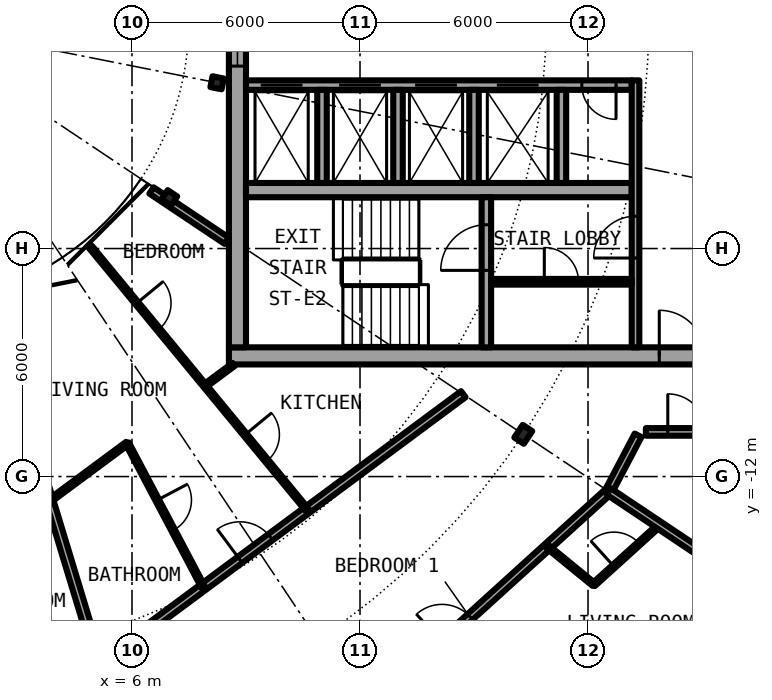
"""IFC4 building model, lengths in metres.
Left out: names, types, materials, properties, quantities, classifications, styles, units other than length and angle.
Written with IfcOpenShell. Run it as: python <this file> out.ifc"""

import sys

from ifc_helpers import new_model, si_unit, direction, frame, frame_2d, origin, origin_2d, place, context, subcontext, project, spatial, rectangle, i_section, extrude, element, fill, save


model = new_model("IFC4")
c1 = context("Model", 3, precision=1e-05, world=origin(), true_north=direction((0.0, 1.0)))
c2 = subcontext(c1, "Body", "Model", "MODEL_VIEW")
j1 = project(units=[si_unit("LENGTHUNIT", "METRE"), si_unit("PLANEANGLEUNIT", "RADIAN")], contexts=[c1])
p1 = place(None, origin())
s1 = spatial("IfcSite", under=j1, at=p1, CompositionType="ELEMENT")
p2 = place(p1, origin())
s2 = spatial("IfcBuilding", under=s1, at=p2, CompositionType="ELEMENT")
p3 = place(p2, frame((0.0, 0.0, 190.2)))
s3 = spatial("IfcBuildingStorey", under=s2, at=p3, CompositionType="ELEMENT", Elevation=190.2)
p4 = place(p3, frame((16.297, -10.889, 0.0), z_axis=(0.0, 0.0, 1.0), x_axis=(0.831469612303, -0.55557023302, 0.0)))
e1 = element("IfcColumn", 1, at=p4, inside=s3, PredefinedType="COLUMN", context=c2, shape_type="SweptSolid", body=[
    extrude(i_section(OverallWidth=0.3, OverallDepth=0.4, WebThickness=0.013, FlangeThickness=0.024, FilletRadius=0.027, at=origin_2d()), origin(), (0.0, 0.0, 1.0), 3.05),
])
for number, where, z_axis, x_axis in (
    (2, (6.984, -4.667, 0.0), (0.0, 0.0, 1.0), (0.831, -0.556, 0.0)),
    (3, (8.239, -1.639, 0.0), (0.0, 0.0, 1.0), (0.981, -0.195, 0.0)),
):
    element("IfcColumn", number, at=place(p3, frame(where, z_axis=z_axis, x_axis=x_axis)), inside=s3, PredefinedType="COLUMN", context=c2, shape_type="SweptSolid", body=[
        extrude(i_section(OverallWidth=0.3, OverallDepth=0.29, WebThickness=0.009, FlangeThickness=0.014, FilletRadius=0.027, at=origin_2d()), origin(), (0.0, 0.0, 1.0), 3.05),
    ])
p5 = place(p3, frame((19.304, -19.304, 0.0), z_axis=(0.0, 0.0, 1.0), x_axis=(0.634382322723, 0.773019449054, 0.0)))
e4 = element("IfcWall", 4, at=p5, inside=s3, PredefinedType="SOLIDWALL", context=c2, shape_type="SweptSolid", body=[
    extrude(rectangle(XDim=5.352, YDim=0.25, at=frame_2d((2.676, 0.0))), origin(), (0.0, 0.0, 1.0), 2.7),
])
p6 = place(p5, frame((0.841, 0.0, 0.0)))
e5 = element("IfcOpeningElement", 5, at=p6, cuts=e4, PredefinedType="OPENING", context=c2, shape_type="SweptSolid", body=[
    extrude(rectangle(XDim=1.0, YDim=2.2, at=frame_2d((0.5, 1.1))), frame((0.0, 0.135, 0.0), z_axis=(0.0, -1.0, 0.0), x_axis=(1.0, 0.0, 0.0)), (0.0, 0.0, 1.0), 0.27),
])
p7 = place(p5, frame((3.111, 0.0, 0.3)))
e6 = element("IfcOpeningElement", 6, at=p7, cuts=e4, PredefinedType="OPENING", context=c2, shape_type="SweptSolid", body=[
    extrude(rectangle(XDim=1.8, YDim=2.1, at=frame_2d((0.9, 1.05))), frame((0.0, 0.135, 0.0), z_axis=(0.0, -1.0, 0.0), x_axis=(1.0, 0.0, 0.0)), (0.0, 0.0, 1.0), 0.27),
])
p8 = place(p3, frame((8.55, -8.825, 0.0), z_axis=(0.0, 0.0, 1.0), x_axis=(1.0, 0.0, 0.0)))
e7 = element("IfcWall", 7, at=p8, inside=s3, PredefinedType="SHEAR", context=c2, shape_type="SweptSolid", body=[
    extrude(rectangle(XDim=13.5, YDim=0.45, at=frame_2d((6.75, 0.0))), origin(), (0.0, 0.0, 1.0), 3.05),
])
p9 = place(p8, frame((11.325, 0.0, 0.0)))
e8 = element("IfcOpeningElement", 8, at=p9, cuts=e7, PredefinedType="OPENING", context=c2, shape_type="SweptSolid", body=[
    extrude(rectangle(XDim=1.2, YDim=2.3, at=frame_2d((0.6, 1.15))), frame((0.0, 0.235, 0.0), z_axis=(0.0, -1.0, 0.0), x_axis=(1.0, 0.0, 0.0)), (0.0, 0.0, 1.0), 0.47),
])
p10 = place(p3, frame((8.775, -8.6, 0.0), z_axis=(0.0, 0.0, 1.0), x_axis=(0.0, 1.0, 0.0)))
e9 = element("IfcWall", 9, at=p10, inside=s3, PredefinedType="SHEAR", context=c2, shape_type="SweptSolid", body=[
    extrude(rectangle(XDim=17.2, YDim=0.45, at=frame_2d((8.6, 0.0))), origin(), (0.0, 0.0, 1.0), 3.05),
])
p11 = place(p10, frame((7.4, 0.0, 0.1)))
e10 = element("IfcOpeningElement", 10, at=p11, cuts=e9, PredefinedType="OPENING", context=c2, shape_type="SweptSolid", body=[
    extrude(rectangle(XDim=2.4, YDim=2.2, at=frame_2d((1.2, 1.1))), frame((0.0, 0.235, 0.0), z_axis=(0.0, -1.0, 0.0), x_axis=(1.0, 0.0, 0.0)), (0.0, 0.0, 1.0), 0.47),
])
p12 = place(p3, frame((19.15, -1.7, 0.0), z_axis=(0.0, 0.0, 1.0), x_axis=(-1.0, 0.0, 0.0)))
e11 = element("IfcWall", 11, at=p12, inside=s3, PredefinedType="SHEAR", context=c2, shape_type="SweptSolid", body=[
    extrude(rectangle(XDim=10.15, YDim=0.25, at=frame_2d((5.075, 0.0))), origin(), (0.0, 0.0, 1.0), 3.05),
])
p13 = place(p12, frame((8.663, 0.0, 0.0)))
e12 = element("IfcOpeningElement", 12, at=p13, cuts=e11, PredefinedType="OPENING", context=c2, shape_type="SweptSolid", body=[
    extrude(rectangle(XDim=1.1, YDim=2.3, at=frame_2d((0.55, 1.15))), frame((0.0, 0.135, 0.0), z_axis=(0.0, -1.0, 0.0), x_axis=(1.0, 0.0, 0.0)), (0.0, 0.0, 1.0), 0.27),
])
p14 = place(p12, frame((6.6, 0.0, 0.0)))
e13 = element("IfcOpeningElement", 13, at=p14, cuts=e11, PredefinedType="OPENING", context=c2, shape_type="SweptSolid", body=[
    extrude(rectangle(XDim=1.1, YDim=2.3, at=frame_2d((0.55, 1.15))), frame((0.0, 0.135, 0.0), z_axis=(0.0, -1.0, 0.0), x_axis=(1.0, 0.0, 0.0)), (0.0, 0.0, 1.0), 0.27),
])
p15 = place(p12, frame((4.6, 0.0, 0.0)))
e14 = element("IfcOpeningElement", 14, at=p15, cuts=e11, PredefinedType="OPENING", context=c2, shape_type="SweptSolid", body=[
    extrude(rectangle(XDim=1.1, YDim=2.3, at=frame_2d((0.55, 1.15))), frame((0.0, 0.135, 0.0), z_axis=(0.0, -1.0, 0.0), x_axis=(1.0, 0.0, 0.0)), (0.0, 0.0, 1.0), 0.27),
])
p16 = place(p12, frame((2.45, 0.0, 0.0)))
e15 = element("IfcOpeningElement", 15, at=p16, cuts=e11, PredefinedType="OPENING", context=c2, shape_type="SweptSolid", body=[
    extrude(rectangle(XDim=1.1, YDim=2.3, at=frame_2d((0.55, 1.15))), frame((0.0, 0.135, 0.0), z_axis=(0.0, -1.0, 0.0), x_axis=(1.0, 0.0, 0.0)), (0.0, 0.0, 1.0), 0.27),
])
p17 = place(p12, frame((0.413, 0.0, 0.0)))
e16 = element("IfcOpeningElement", 16, at=p17, cuts=e11, PredefinedType="OPENING", context=c2, shape_type="SweptSolid", body=[
    extrude(rectangle(XDim=0.9, YDim=2.3, at=frame_2d((0.45, 1.15))), frame((0.0, 0.135, 0.0), z_axis=(0.0, -1.0, 0.0), x_axis=(1.0, 0.0, 0.0)), (0.0, 0.0, 1.0), 0.27),
])
p18 = place(p3, frame((9.0, -4.462, 0.0), z_axis=(0.0, 0.0, 1.0), x_axis=(1.0, 0.0, 0.0)))
e17 = element("IfcWall", 17, at=p18, inside=s3, PredefinedType="SHEAR", context=c2, shape_type="SweptSolid", body=[
    extrude(rectangle(XDim=10.15, YDim=0.375, at=frame_2d((5.075, 0.0))), origin(), (0.0, 0.0, 1.0), 3.05),
])
p19 = place(p3, frame((15.325, -8.6, 0.0), z_axis=(0.0, 0.0, 1.0), x_axis=(0.0, 1.0, 0.0)))
e18 = element("IfcWall", 18, at=p19, inside=s3, PredefinedType="SHEAR", context=c2, shape_type="SweptSolid", body=[
    extrude(rectangle(XDim=3.95, YDim=0.25, at=frame_2d((1.975, 0.0))), origin(), (0.0, 0.0, 1.0), 3.05),
])
p20 = place(p19, frame((2.025, 0.0, 0.0)))
e19 = element("IfcOpeningElement", 19, at=p20, cuts=e18, PredefinedType="OPENING", context=c2, shape_type="SweptSolid", body=[
    extrude(rectangle(XDim=1.2, YDim=2.3, at=frame_2d((0.6, 1.15))), frame((0.0, 0.135, 0.0), z_axis=(0.0, -1.0, 0.0), x_axis=(1.0, 0.0, 0.0)), (0.0, 0.0, 1.0), 0.27),
])
for number, where, z_axis, x_axis in (
    (20, (15.0, -1.825, 0.0), (0.0, 0.0, 1.0), (0.0, -1.0, 0.0)),
    (21, (17.3, -1.825, 0.0), (0.0, 0.0, 1.0), (0.0, -1.0, 0.0)),
):
    element("IfcWall", number, at=place(p3, frame(where, z_axis=z_axis, x_axis=x_axis)), inside=s3, PredefinedType="SOLIDWALL", context=c2, shape_type="SweptSolid", body=[
        extrude(rectangle(XDim=2.45, YDim=0.25, at=frame_2d((1.225, 0.0))), origin(), (0.0, 0.0, 1.0), 2.7),
    ])
p21 = place(p3, frame((19.25, -8.6, 0.0), z_axis=(0.0, 0.0, 1.0), x_axis=(0.0, 1.0, 0.0)))
e22 = element("IfcWall", 22, at=p21, inside=s3, PredefinedType="SOLIDWALL", context=c2, shape_type="SweptSolid", body=[
    extrude(rectangle(XDim=7.025, YDim=0.2, at=frame_2d((3.513, 0.0))), origin(), (0.0, 0.0, 1.0), 2.7),
])
p22 = place(p21, frame((2.35, 0.0, 0.0)))
e23 = element("IfcOpeningElement", 23, at=p22, cuts=e22, PredefinedType="OPENING", context=c2, shape_type="SweptSolid", body=[
    extrude(rectangle(XDim=1.1, YDim=2.3, at=frame_2d((0.55, 1.15))), frame((0.0, 0.11, 0.0), z_axis=(0.0, -1.0, 0.0), x_axis=(1.0, 0.0, 0.0)), (0.0, 0.0, 1.0), 0.22),
])
for number, where, z_axis, x_axis in (
    (24, (11.0, -1.825, 0.0), (0.0, 0.0, 1.0), (0.0, -1.0, 0.0)),
    (25, (13.0, -1.825, 0.0), (0.0, 0.0, 1.0), (0.0, -1.0, 0.0)),
):
    element("IfcWall", number, at=place(p3, frame(where, z_axis=z_axis, x_axis=x_axis)), inside=s3, PredefinedType="SOLIDWALL", context=c2, shape_type="SweptSolid", body=[
        extrude(rectangle(XDim=2.45, YDim=0.25, at=frame_2d((1.225, 0.0))), origin(), (0.0, 0.0, 1.0), 2.7),
    ])
p23 = place(p3, frame((15.45, -6.875, 0.0), z_axis=(0.0, 0.0, 1.0), x_axis=(1.0, 0.0, 0.0)))
e26 = element("IfcWall", 26, at=p23, inside=s3, PredefinedType="PARTITIONING", context=c2, shape_type="SweptSolid", body=[
    extrude(rectangle(XDim=3.7, YDim=0.15, at=frame_2d((1.85, 0.0))), origin(), (0.0, 0.0, 1.0), 2.7),
])
p24 = place(p23, frame((1.4, 0.0, 0.0)))
e27 = element("IfcOpeningElement", 27, at=p24, cuts=e26, PredefinedType="OPENING", context=c2, shape_type="SweptSolid", body=[
    extrude(rectangle(XDim=0.9, YDim=2.3, at=frame_2d((0.45, 1.15))), frame((0.0, 0.085, 0.0), z_axis=(0.0, -1.0, 0.0), x_axis=(1.0, 0.0, 0.0)), (0.0, 0.0, 1.0), 0.17),
])
p25 = place(p3, frame((18.147, -14.844, 0.0), z_axis=(0.0, 0.0, 1.0), x_axis=(0.741080073381, 0.671416655169, 0.0)))
e28 = element("IfcWall", 28, at=p25, inside=s3, PredefinedType="PARTITIONING", context=c2, shape_type="SweptSolid", body=[
    extrude(rectangle(XDim=2.323, YDim=0.1, at=frame_2d((1.162, 0.0))), origin(), (0.0, 0.0, 1.0), 2.7),
])
p26 = place(p25, frame((0.718, 0.0, 0.0)))
e29 = element("IfcOpeningElement", 29, at=p26, cuts=e28, PredefinedType="OPENING", context=c2, shape_type="SweptSolid", body=[
    extrude(rectangle(XDim=0.9, YDim=2.3, at=frame_2d((0.45, 1.15))), frame((0.0, 0.06, 0.0), z_axis=(0.0, -1.0, 0.0), x_axis=(1.0, 0.0, 0.0)), (0.0, 0.0, 1.0), 0.12),
])
p27 = place(p3, frame((18.542, -12.389, 0.0), z_axis=(0.0, 0.0, 1.0), x_axis=(0.465359652486, 0.885121683068, 0.0)))
e30 = element("IfcWall", 30, at=p27, inside=s3, PredefinedType="PARTITIONING", context=c2, shape_type="SweptSolid", body=[
    extrude(rectangle(XDim=1.665, YDim=0.2, at=frame_2d((0.833, 0.0))), origin(), (0.0, 0.0, 1.0), 2.7),
])
p28 = place(p3, frame((10.51, -19.669, 0.0), z_axis=(0.0, 0.0, 1.0), x_axis=(0.74093897184, 0.671572363941, 0.0)))
e31 = element("IfcWall", 31, at=p28, inside=s3, PredefinedType="PARTITIONING", context=c2, shape_type="SweptSolid", body=[
    extrude(rectangle(XDim=10.84, YDim=0.2, at=frame_2d((5.42, 0.0))), origin(), (0.0, 0.0, 1.0), 2.7),
])
p29 = place(p28, frame((4.922, 0.0, 0.0)))
e32 = element("IfcOpeningElement", 32, at=p29, cuts=e31, PredefinedType="OPENING", context=c2, shape_type="SweptSolid", body=[
    extrude(rectangle(XDim=1.0, YDim=2.3, at=frame_2d((0.5, 1.15))), frame((0.0, 0.11, 0.0), z_axis=(0.0, -1.0, 0.0), x_axis=(1.0, 0.0, 0.0)), (0.0, 0.0, 1.0), 0.22),
])
p30 = place(p3, frame((5.137, -16.938, 0.0), z_axis=(0.0, 0.0, 1.0), x_axis=(0.803240181354, 0.595655278712, 0.0)))
e33 = element("IfcWall", 33, at=p30, inside=s3, PredefinedType="PARTITIONING", context=c2, shape_type="SweptSolid", body=[
    extrude(rectangle(XDim=11.928, YDim=0.2, at=frame_2d((5.964, 0.0))), origin(), (0.0, 0.0, 1.0), 2.7),
])
p31 = place(p30, frame((4.612, 0.0, 0.0)))
e34 = element("IfcOpeningElement", 34, at=p31, cuts=e33, PredefinedType="OPENING", context=c2, shape_type="SweptSolid", body=[
    extrude(rectangle(XDim=1.0, YDim=2.3, at=frame_2d((0.5, 1.15))), frame((0.0, 0.11, 0.0), z_axis=(0.0, -1.0, 0.0), x_axis=(1.0, 0.0, 0.0)), (0.0, 0.0, 1.0), 0.22),
])
p32 = place(p3, frame((3.83, -12.641, 0.0), z_axis=(0.0, 0.0, 1.0), x_axis=(0.803533389313, 0.595259684725, 0.0)))
e35 = element("IfcWall", 35, at=p32, inside=s3, PredefinedType="PARTITIONING", context=c2, shape_type="SweptSolid", body=[
    extrude(rectangle(XDim=2.544, YDim=0.1, at=frame_2d((1.272, 0.0))), origin(), (0.0, 0.0, 1.0), 2.7),
])
p33 = place(p3, frame((7.919, -9.611, 0.0), z_axis=(0.0, 0.0, 1.0), x_axis=(0.803437844371, 0.595388637977, 0.0)))
e36 = element("IfcWall", 36, at=p33, inside=s3, PredefinedType="PARTITIONING", context=c2, shape_type="SweptSolid", body=[
    extrude(rectangle(XDim=0.942, YDim=0.1, at=frame_2d((0.471, 0.0))), origin(), (0.0, 0.0, 1.0), 2.7),
])
p34 = place(p3, frame((19.523, -10.825, 0.0), z_axis=(0.0, 0.0, 1.0), x_axis=(1.0, 0.0, 0.0)))
e37 = element("IfcWall", 37, at=p34, inside=s3, PredefinedType="PARTITIONING", context=c2, shape_type="SweptSolid", body=[
    extrude(rectangle(XDim=2.152, YDim=0.2, at=frame_2d((1.076, 0.0))), origin(), (0.0, 0.0, 1.0), 2.7),
])
p35 = place(p34, frame((0.576, 0.0, 0.0)))
e38 = element("IfcOpeningElement", 38, at=p35, cuts=e37, PredefinedType="OPENING", context=c2, shape_type="SweptSolid", body=[
    extrude(rectangle(XDim=1.0, YDim=2.3, at=frame_2d((0.5, 1.15))), frame((0.0, 0.11, 0.0), z_axis=(0.0, -1.0, 0.0), x_axis=(1.0, 0.0, 0.0)), (0.0, 0.0, 1.0), 0.22),
])
p36 = place(p3, frame((6.513, -4.472, 0.0), z_axis=(0.0, 0.0, 1.0), x_axis=(0.831403409976, -0.555669299026, 0.0)))
e39 = element("IfcWall", 39, at=p36, inside=s3, PredefinedType="PARTITIONING", context=c2, shape_type="SweptSolid", body=[
    extrude(rectangle(XDim=2.383, YDim=0.2, at=frame_2d((1.191, 0.0))), origin(), (0.0, 0.0, 1.0), 2.7),
])
p37 = place(p3, frame((2.241, -7.388, 0.0), z_axis=(0.0, 0.0, 1.0), x_axis=(0.290284403441, -0.956940418793, 0.0)))
e40 = element("IfcWall", 40, at=p37, inside=s3, PredefinedType="PARTITIONING", context=c2, shape_type="SweptSolid", body=[
    extrude(rectangle(XDim=9.98, YDim=0.2, at=frame_2d((4.99, 0.0))), origin(), (0.0, 0.0, 1.0), 2.7),
])
p38 = place(p3, frame((4.908, -5.959, 0.0), z_axis=(0.0, 0.0, 1.0), x_axis=(0.636115614725, -0.771593756262, 0.0)))
e41 = element("IfcWall", 41, at=p38, inside=s3, PredefinedType="PARTITIONING", context=c2, shape_type="SweptSolid", body=[
    extrude(rectangle(XDim=8.967, YDim=0.1, at=frame_2d((4.483, 0.0))), origin(), (0.0, 0.0, 1.0), 2.7),
])
p39 = place(p38, frame((6.4, 0.0, 0.0)))
e42 = element("IfcOpeningElement", 42, at=p39, cuts=e41, PredefinedType="OPENING", context=c2, shape_type="SweptSolid", body=[
    extrude(rectangle(XDim=0.9, YDim=2.3, at=frame_2d((0.45, 1.15))), frame((0.0, 0.06, 0.0), z_axis=(0.0, -1.0, 0.0), x_axis=(1.0, 0.0, 0.0)), (0.0, 0.0, 1.0), 0.12),
])
p40 = place(p38, frame((1.917, 0.0, 0.0)))
e43 = element("IfcOpeningElement", 43, at=p40, cuts=e41, PredefinedType="OPENING", context=c2, shape_type="SweptSolid", body=[
    extrude(rectangle(XDim=0.9, YDim=2.3, at=frame_2d((0.45, 1.15))), frame((0.0, 0.06, 0.0), z_axis=(0.0, -1.0, 0.0), x_axis=(1.0, 0.0, 0.0)), (0.0, 0.0, 1.0), 0.12),
])
p41 = place(p3, frame((5.876, -11.126, 0.0), z_axis=(0.0, 0.0, 1.0), x_axis=(0.467030118529, -0.884241408432, 0.0)))
e44 = element("IfcWall", 44, at=p41, inside=s3, PredefinedType="PARTITIONING", context=c2, shape_type="SweptSolid", body=[
    extrude(rectangle(XDim=4.278, YDim=0.1, at=frame_2d((2.139, 0.0))), origin(), (0.0, 0.0, 1.0), 2.7),
])
p42 = place(p41, frame((1.689, 0.0, 0.0)))
e45 = element("IfcOpeningElement", 45, at=p42, cuts=e44, PredefinedType="OPENING", context=c2, shape_type="SweptSolid", body=[
    extrude(rectangle(XDim=0.9, YDim=2.3, at=frame_2d((0.45, 1.15))), frame((0.0, 0.06, 0.0), z_axis=(0.0, -1.0, 0.0), x_axis=(1.0, 0.0, 0.0)), (0.0, 0.0, 1.0), 0.12),
])
p43 = place(p3, frame((16.936, -13.845, 0.0), z_axis=(0.0, 0.0, 1.0), x_axis=(0.774283039722, -0.632839453889, 0.0)))
e46 = element("IfcWall", 46, at=p43, inside=s3, PredefinedType="PARTITIONING", context=c2, shape_type="SweptSolid", body=[
    extrude(rectangle(XDim=1.569, YDim=0.1, at=frame_2d((0.785, 0.0))), origin(), (0.0, 0.0, 1.0), 2.7),
])
p44 = place(p3, frame((18.542, -12.389, 0.0), z_axis=(0.0, 0.0, 1.0), x_axis=(0.831387096605, -0.55569370664, 0.0)))
e47 = element("IfcWall", 47, at=p44, inside=s3, PredefinedType="PARTITIONING", context=c2, shape_type="SweptSolid", body=[
    extrude(rectangle(XDim=4.875, YDim=0.2, at=frame_2d((2.438, 0.0))), origin(), (0.0, 0.0, 1.0), 2.7),
])
p45 = place(p13, origin())
e48 = element("IfcDoor", 48, at=p45, inside=s3, OperationType="DOUBLE_DOOR_SLIDING", PredefinedType="DOOR", context=c2, shape_type="SweptSolid", body=[
    extrude(rectangle(XDim=1.1, YDim=2.3, at=frame_2d((0.55, 1.15))), frame((0.0, 0.025, 0.0), z_axis=(0.0, -1.0, 0.0), x_axis=(1.0, 0.0, 0.0)), (0.0, 0.0, 1.0), 0.05),
])
fill(e12, e48)
p46 = place(p14, origin())
e49 = element("IfcDoor", 49, at=p46, inside=s3, OperationType="DOUBLE_DOOR_SLIDING", PredefinedType="DOOR", context=c2, shape_type="SweptSolid", body=[
    extrude(rectangle(XDim=1.1, YDim=2.3, at=frame_2d((0.55, 1.15))), frame((0.0, 0.025, 0.0), z_axis=(0.0, -1.0, 0.0), x_axis=(1.0, 0.0, 0.0)), (0.0, 0.0, 1.0), 0.05),
])
fill(e13, e49)
p47 = place(p15, origin())
e50 = element("IfcDoor", 50, at=p47, inside=s3, OperationType="DOUBLE_DOOR_SLIDING", PredefinedType="DOOR", context=c2, shape_type="SweptSolid", body=[
    extrude(rectangle(XDim=1.1, YDim=2.3, at=frame_2d((0.55, 1.15))), frame((0.0, 0.025, 0.0), z_axis=(0.0, -1.0, 0.0), x_axis=(1.0, 0.0, 0.0)), (0.0, 0.0, 1.0), 0.05),
])
fill(e14, e50)
p48 = place(p16, origin())
e51 = element("IfcDoor", 51, at=p48, inside=s3, OperationType="DOUBLE_DOOR_SLIDING", PredefinedType="DOOR", context=c2, shape_type="SweptSolid", body=[
    extrude(rectangle(XDim=1.1, YDim=2.3, at=frame_2d((0.55, 1.15))), frame((0.0, 0.025, 0.0), z_axis=(0.0, -1.0, 0.0), x_axis=(1.0, 0.0, 0.0)), (0.0, 0.0, 1.0), 0.05),
])
fill(e15, e51)
p49 = place(p17, origin())
e52 = element("IfcDoor", 52, at=p49, inside=s3, OperationType="SINGLE_SWING_RIGHT", PredefinedType="DOOR", context=c2, shape_type="SweptSolid", body=[
    extrude(rectangle(XDim=0.9, YDim=2.3, at=frame_2d((0.45, 1.15))), frame((0.0, 0.025, 0.0), z_axis=(0.0, -1.0, 0.0), x_axis=(1.0, 0.0, 0.0)), (0.0, 0.0, 1.0), 0.05),
])
fill(e16, e52)
p50 = place(p24, origin())
e53 = element("IfcDoor", 53, at=p50, inside=s3, OperationType="SINGLE_SWING_LEFT", PredefinedType="DOOR", context=c2, shape_type="SweptSolid", body=[
    extrude(rectangle(XDim=0.9, YDim=2.3, at=frame_2d((0.45, 1.15))), frame((0.0, 0.025, 0.0), z_axis=(0.0, -1.0, 0.0), x_axis=(1.0, 0.0, 0.0)), (0.0, 0.0, 1.0), 0.05),
])
fill(e27, e53)
p51 = place(p20, origin())
e54 = element("IfcDoor", 54, at=p51, inside=s3, OperationType="SINGLE_SWING_LEFT", PredefinedType="DOOR", context=c2, shape_type="SweptSolid", body=[
    extrude(rectangle(XDim=1.2, YDim=2.3, at=frame_2d((0.6, 1.15))), frame((0.0, 0.025, 0.0), z_axis=(0.0, -1.0, 0.0), x_axis=(1.0, 0.0, 0.0)), (0.0, 0.0, 1.0), 0.05),
])
fill(e19, e54)
p52 = place(p22, origin())
e55 = element("IfcDoor", 55, at=p52, inside=s3, OperationType="SINGLE_SWING_RIGHT", PredefinedType="DOOR", context=c2, shape_type="SweptSolid", body=[
    extrude(rectangle(XDim=1.1, YDim=2.3, at=frame_2d((0.55, 1.15))), frame((0.0, 0.025, 0.0), z_axis=(0.0, -1.0, 0.0), x_axis=(1.0, 0.0, 0.0)), (0.0, 0.0, 1.0), 0.05),
])
fill(e23, e55)
p53 = place(p9, origin())
e56 = element("IfcDoor", 56, at=p53, inside=s3, OperationType="SINGLE_SWING_LEFT", PredefinedType="DOOR", context=c2, shape_type="SweptSolid", body=[
    extrude(rectangle(XDim=1.2, YDim=2.3, at=frame_2d((0.6, 1.15))), frame((0.0, 0.025, 0.0), z_axis=(0.0, -1.0, 0.0), x_axis=(1.0, 0.0, 0.0)), (0.0, 0.0, 1.0), 0.05),
])
fill(e8, e56)
p54 = place(p11, origin())
e57 = element("IfcWindow", 57, at=p54, inside=s3, PartitioningType="SINGLE_PANEL", PredefinedType="WINDOW", context=c2, shape_type="SweptSolid", body=[
    extrude(rectangle(XDim=2.4, YDim=2.2, at=frame_2d((1.2, 1.1))), frame((0.0, 0.03, 0.0), z_axis=(0.0, -1.0, 0.0), x_axis=(1.0, 0.0, 0.0)), (0.0, 0.0, 1.0), 0.06),
])
fill(e10, e57)
p55 = place(p29, origin())
e58 = element("IfcDoor", 58, at=p55, inside=s3, OperationType="SINGLE_SWING_RIGHT", PredefinedType="DOOR", context=c2, shape_type="SweptSolid", body=[
    extrude(rectangle(XDim=1.0, YDim=2.3, at=frame_2d((0.5, 1.15))), frame((0.0, 0.025, 0.0), z_axis=(0.0, -1.0, 0.0), x_axis=(1.0, 0.0, 0.0)), (0.0, 0.0, 1.0), 0.05),
])
fill(e32, e58)
p56 = place(p26, origin())
e59 = element("IfcDoor", 59, at=p56, inside=s3, OperationType="SINGLE_SWING_RIGHT", PredefinedType="DOOR", context=c2, shape_type="SweptSolid", body=[
    extrude(rectangle(XDim=0.9, YDim=2.3, at=frame_2d((0.45, 1.15))), frame((0.0, 0.025, 0.0), z_axis=(0.0, -1.0, 0.0), x_axis=(1.0, 0.0, 0.0)), (0.0, 0.0, 1.0), 0.05),
])
fill(e29, e59)
p57 = place(p31, origin())
e60 = element("IfcDoor", 60, at=p57, inside=s3, OperationType="SINGLE_SWING_LEFT", PredefinedType="DOOR", context=c2, shape_type="SweptSolid", body=[
    extrude(rectangle(XDim=1.0, YDim=2.3, at=frame_2d((0.5, 1.15))), frame((0.0, 0.025, 0.0), z_axis=(0.0, -1.0, 0.0), x_axis=(1.0, 0.0, 0.0)), (0.0, 0.0, 1.0), 0.05),
])
fill(e34, e60)
p58 = place(p42, origin())
e61 = element("IfcDoor", 61, at=p58, inside=s3, OperationType="SINGLE_SWING_LEFT", PredefinedType="DOOR", context=c2, shape_type="SweptSolid", body=[
    extrude(rectangle(XDim=0.9, YDim=2.3, at=frame_2d((0.45, 1.15))), frame((0.0, 0.025, 0.0), z_axis=(0.0, -1.0, 0.0), x_axis=(1.0, 0.0, 0.0)), (0.0, 0.0, 1.0), 0.05),
])
fill(e45, e61)
p59 = place(p39, origin())
e62 = element("IfcDoor", 62, at=p59, inside=s3, OperationType="SINGLE_SWING_RIGHT", PredefinedType="DOOR", context=c2, shape_type="SweptSolid", body=[
    extrude(rectangle(XDim=0.9, YDim=2.3, at=frame_2d((0.45, 1.15))), frame((0.0, 0.025, 0.0), z_axis=(0.0, -1.0, 0.0), x_axis=(1.0, 0.0, 0.0)), (0.0, 0.0, 1.0), 0.05),
])
fill(e42, e62)
p60 = place(p40, origin())
e63 = element("IfcDoor", 63, at=p60, inside=s3, OperationType="SINGLE_SWING_LEFT", PredefinedType="DOOR", context=c2, shape_type="SweptSolid", body=[
    extrude(rectangle(XDim=0.9, YDim=2.3, at=frame_2d((0.45, 1.15))), frame((0.0, 0.025, 0.0), z_axis=(0.0, -1.0, 0.0), x_axis=(1.0, 0.0, 0.0)), (0.0, 0.0, 1.0), 0.05),
])
fill(e43, e63)
p61 = place(p35, origin())
e64 = element("IfcDoor", 64, at=p61, inside=s3, OperationType="SINGLE_SWING_LEFT", PredefinedType="DOOR", context=c2, shape_type="SweptSolid", body=[
    extrude(rectangle(XDim=1.0, YDim=2.3, at=frame_2d((0.5, 1.15))), frame((0.0, 0.025, 0.0), z_axis=(0.0, -1.0, 0.0), x_axis=(1.0, 0.0, 0.0)), (0.0, 0.0, 1.0), 0.05),
])
fill(e38, e64)
save(model, sys.argv[1])
